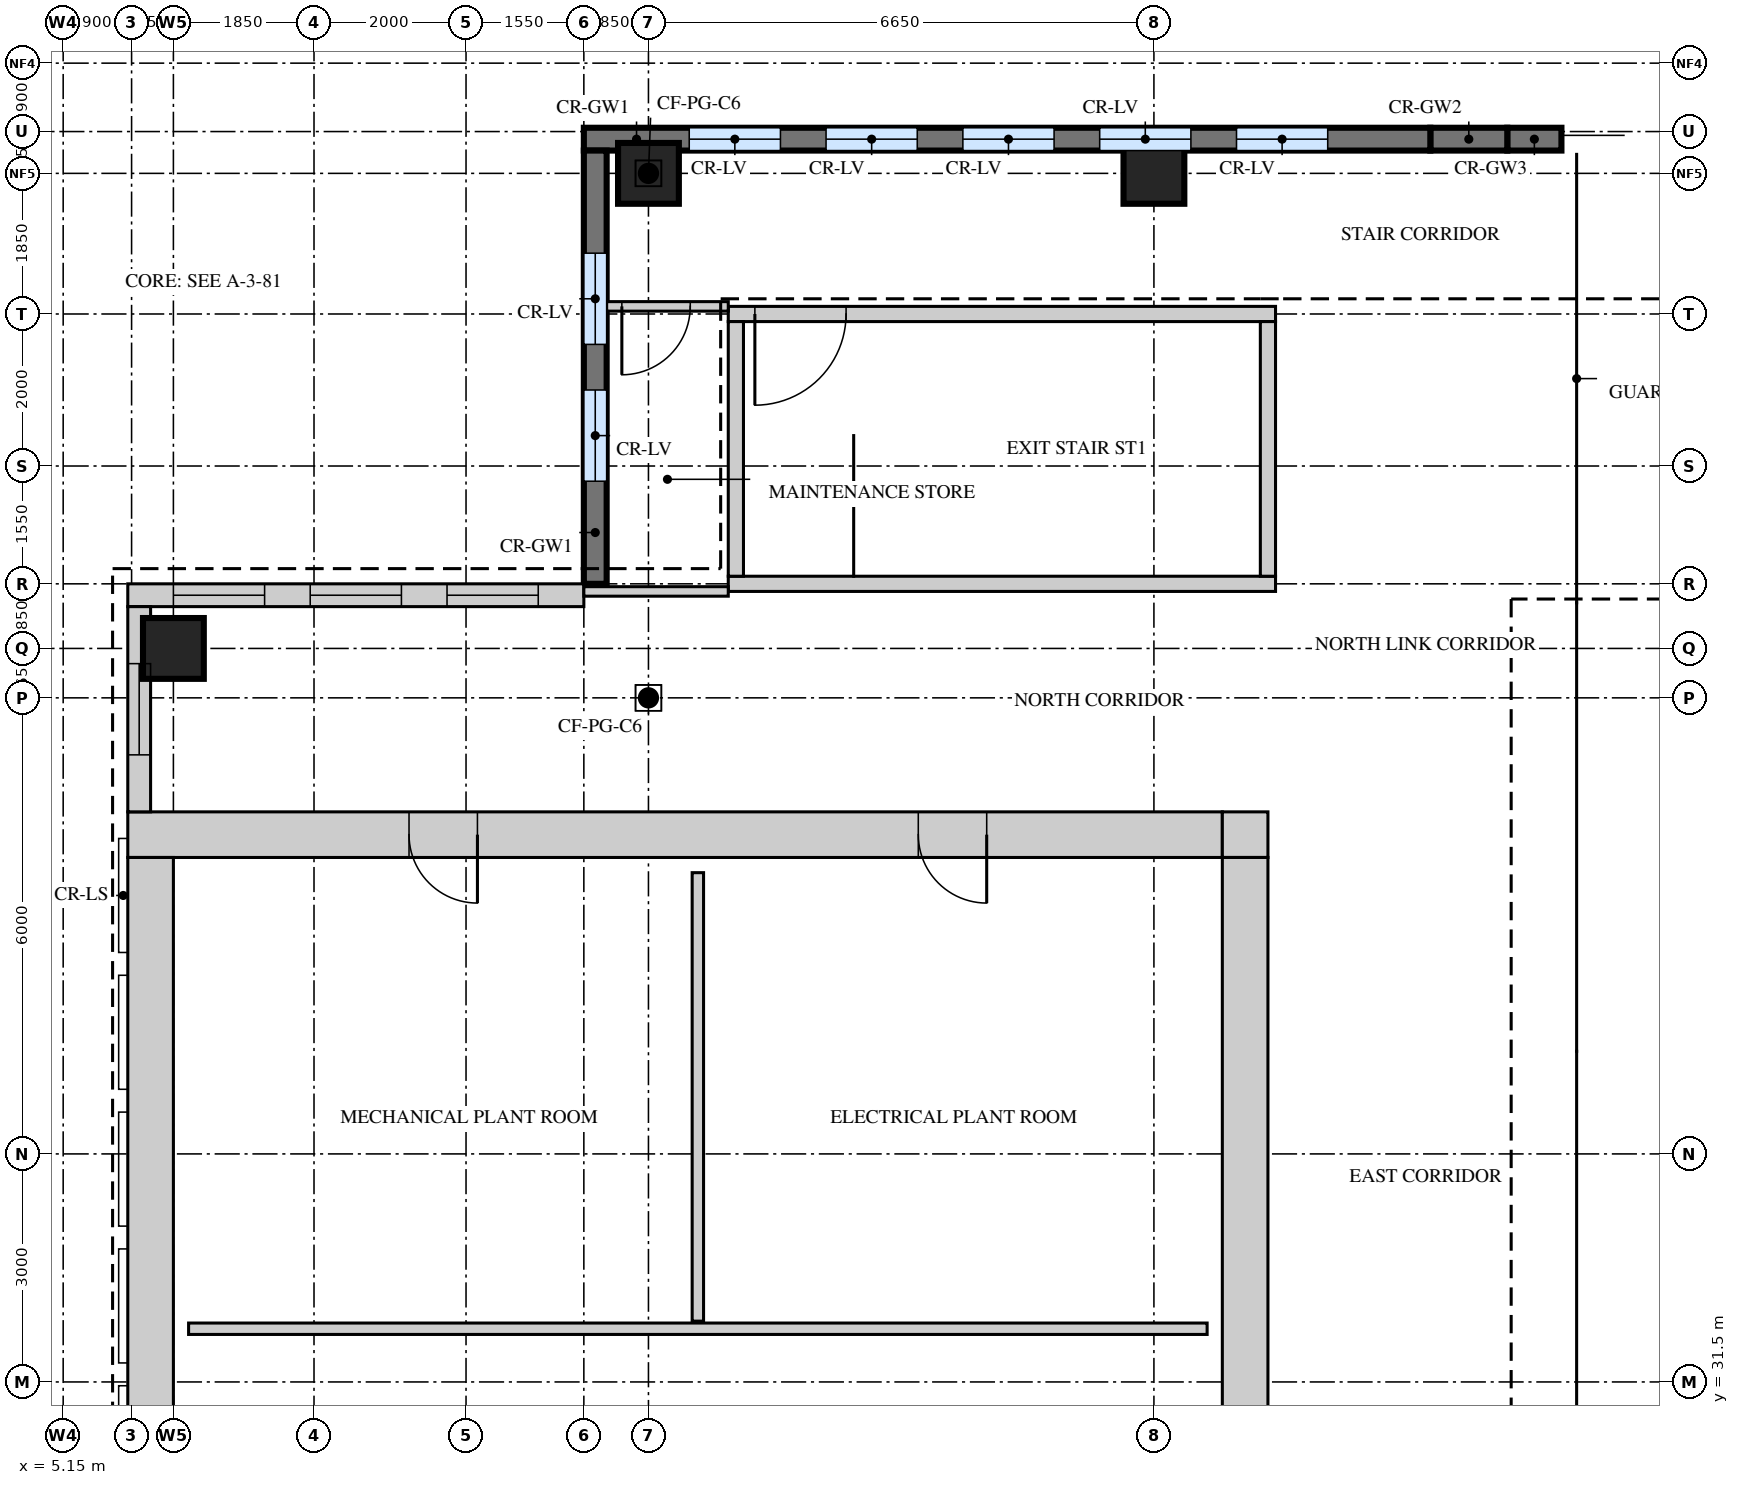
"""IFC4 building model, lengths in metres.
Left out: names, types, materials, properties, quantities, classifications, styles, units other than length and angle.
Written with IfcOpenShell. Run it as: python <this file> out.ifc"""

import sys

from ifc_helpers import new_model, si_unit, direction, frame, frame_2d, origin, origin_2d, place, context, subcontext, project, spatial, rectangle, extrude, source, transform, mapped, element, fill, save


model = new_model("IFC4")
c1 = context("Model", 3, precision=1e-05, world=origin(), true_north=direction((0.0, 1.0)))
c2 = subcontext(c1, "Body", "Model", "MODEL_VIEW")
j1 = project(units=[si_unit("LENGTHUNIT", "METRE"), si_unit("PLANEANGLEUNIT", "RADIAN")], contexts=[c1])
p1 = place(None, origin())
s1 = spatial("IfcSite", under=j1, at=p1, CompositionType="ELEMENT")
p2 = place(p1, origin())
s2 = spatial("IfcBuilding", under=s1, at=p2, CompositionType="ELEMENT")
p3 = place(p2, frame((0.0, 0.0, 352.7)))
s3 = spatial("IfcBuildingStorey", under=s2, at=p3, CompositionType="ELEMENT", Elevation=352.7)
m1 = source(origin(), c2, "Body", "SweptSolid", [
    extrude(rectangle(XDim=14.4, YDim=0.6, at=frame_2d((7.2, 0.0))), origin(), (0.0, 0.0, 1.0), 4.5),
])
p4 = place(p3, frame((6.0, 38.7, 0.0), z_axis=(0.0, 0.0, 1.0), x_axis=(1.0, 0.0, 0.0)))
e1 = element("IfcWall", 1, at=p4, inside=s3, PredefinedType="SHEAR", context=c2, shape_type="MappedRepresentation", body=[
    mapped(m1, transform((0.0, 0.0, 0.0))),
])
m2 = source(origin(), c2, "Body", "SweptSolid", [
    extrude(rectangle(XDim=0.9, YDim=2.1, at=frame_2d((0.45, 1.05))), frame((0.0, 0.31, 0.0), z_axis=(0.0, -1.0, 0.0), x_axis=(1.0, 0.0, 0.0)), (0.0, 0.0, 1.0), 0.62),
])
p5 = place(p4, frame((3.7, 0.0, 0.0)))
e2 = element("IfcOpeningElement", 2, at=p5, cuts=e1, PredefinedType="OPENING", context=c2, shape_type="MappedRepresentation", body=[
    mapped(m2, transform((0.0, 0.0, 0.0))),
])
p6 = place(p4, frame((10.4, 0.0, 0.0)))
e3 = element("IfcOpeningElement", 3, at=p6, cuts=e1, PredefinedType="OPENING", context=c2, shape_type="MappedRepresentation", body=[
    mapped(m2, transform((0.0, 0.0, 0.0))),
])
m3 = source(origin(), c2, "Body", "SweptSolid", [
    extrude(rectangle(XDim=0.6, YDim=0.6, at=frame_2d((0.3, 0.0))), origin(), (0.0, 0.0, 1.0), 4.5),
])
p7 = place(p3, frame((20.4, 38.7, 0.0), z_axis=(0.0, 0.0, 1.0), x_axis=(1.0, 0.0, 0.0)))
e4 = element("IfcWall", 4, at=p7, inside=s3, PredefinedType="SHEAR", context=c2, shape_type="MappedRepresentation", body=[
    mapped(m3, transform((0.0, 0.0, 0.0))),
])
m4 = source(origin(), c2, "Body", "SweptSolid", [
    extrude(rectangle(XDim=22.8, YDim=0.6, at=frame_2d((11.4, 0.0))), origin(), (0.0, 0.0, 1.0), 4.5),
])
p8 = place(p3, frame((20.7, 15.6, 0.0), z_axis=(0.0, 0.0, 1.0), x_axis=(0.0, 1.0, 0.0)))
e5 = element("IfcWall", 5, at=p8, inside=s3, PredefinedType="SHEAR", context=c2, shape_type="MappedRepresentation", body=[
    mapped(m4, transform((0.0, 0.0, 0.0))),
])
p9 = place(p8, frame((8.2, 0.0, 0.0)))
e6 = element("IfcOpeningElement", 6, at=p9, cuts=e5, PredefinedType="OPENING", context=c2, shape_type="MappedRepresentation", body=[
    mapped(m2, transform((0.0, 0.0, 0.0))),
])
p10 = place(p8, frame((11.35, 0.0, 0.0)))
e7 = element("IfcOpeningElement", 7, at=p10, cuts=e5, PredefinedType="OPENING", context=c2, shape_type="MappedRepresentation", body=[
    mapped(m2, transform((0.0, 0.0, 0.0))),
])
p11 = place(p8, frame((14.65, 0.0, 0.0)))
e8 = element("IfcOpeningElement", 8, at=p11, cuts=e5, PredefinedType="OPENING", context=c2, shape_type="MappedRepresentation", body=[
    mapped(m2, transform((0.0, 0.0, 0.0))),
])
p12 = place(p8, frame((1.55, 0.0, 0.0)))
e9 = element("IfcOpeningElement", 9, at=p12, cuts=e5, PredefinedType="OPENING", context=c2, shape_type="MappedRepresentation", body=[
    mapped(m2, transform((0.0, 0.0, 0.0))),
])
p13 = place(p8, frame((5.1, 0.0, 0.0)))
e10 = element("IfcOpeningElement", 10, at=p13, cuts=e5, PredefinedType="OPENING", context=c2, shape_type="MappedRepresentation", body=[
    mapped(m2, transform((0.0, 0.0, 0.0))),
])
p14 = place(p3, frame((6.3, 15.6, 0.0), z_axis=(0.0, 0.0, 1.0), x_axis=(0.0, 1.0, 0.0)))
e11 = element("IfcWall", 11, at=p14, inside=s3, PredefinedType="SHEAR", context=c2, shape_type="MappedRepresentation", body=[
    mapped(m4, transform((0.0, 0.0, 0.0))),
])
m5 = source(origin(), c2, "Body", "SweptSolid", [
    extrude(rectangle(XDim=7.2, YDim=0.2, at=frame_2d((3.6, 0.0))), origin(), (0.0, 0.0, 1.0), 4.5),
])
p15 = place(p3, frame((13.9, 45.55, 0.0), z_axis=(0.0, 0.0, 1.0), x_axis=(1.0, 0.0, 0.0)))
e12 = element("IfcWall", 12, at=p15, inside=s3, PredefinedType="SHEAR", context=c2, shape_type="MappedRepresentation", body=[
    mapped(m5, transform((0.0, 0.0, 0.0))),
])
m6 = source(origin(), c2, "Body", "SweptSolid", [
    extrude(rectangle(XDim=1.2, YDim=2.1, at=frame_2d((0.6, 1.05))), frame((0.0, 0.11, 0.0), z_axis=(0.0, -1.0, 0.0), x_axis=(1.0, 0.0, 0.0)), (0.0, 0.0, 1.0), 0.22),
])
p16 = place(p15, frame((0.35, 0.0, 0.0)))
e13 = element("IfcOpeningElement", 13, at=p16, cuts=e12, PredefinedType="OPENING", context=c2, shape_type="MappedRepresentation", body=[
    mapped(m6, transform((0.0, 0.0, 0.0))),
])
p17 = place(p3, frame((13.9, 42.0, 0.0), z_axis=(0.0, 0.0, 1.0), x_axis=(1.0, 0.0, 0.0)))
e14 = element("IfcWall", 14, at=p17, inside=s3, PredefinedType="SHEAR", context=c2, shape_type="MappedRepresentation", body=[
    mapped(m5, transform((0.0, 0.0, 0.0))),
])
m7 = source(origin(), c2, "Body", "SweptSolid", [
    extrude(rectangle(XDim=3.35, YDim=0.2, at=frame_2d((1.675, 0.0))), origin(), (0.0, 0.0, 1.0), 4.5),
])
for number, where, z_axis, x_axis in (
    (15, (21.0, 42.1, 0.0), (0.0, 0.0, 1.0), (0.0, 1.0, 0.0)),
    (16, (14.0, 42.1, 0.0), (0.0, 0.0, 1.0), (0.0, 1.0, 0.0)),
):
    element("IfcWall", number, at=place(p3, frame(where, z_axis=z_axis, x_axis=x_axis)), inside=s3, PredefinedType="SHEAR", context=c2, shape_type="MappedRepresentation", body=[
        mapped(m7, transform((0.0, 0.0, 0.0))),
    ])
m8 = source(origin(), c2, "Body", "SweptSolid", [
    extrude(rectangle(XDim=0.8, YDim=0.8, at=origin_2d()), origin(), (0.0, 0.0, 1.0), 3.45),
])
for number, where, z_axis, x_axis in (
    (17, (12.85, 47.4, 0.0), (0.0, 0.0, 1.0), (1.0, 0.0, 0.0)),
    (18, (19.5, 47.4, 0.0), (0.0, 0.0, 1.0), (1.0, 0.0, 0.0)),
    (19, (6.6, 41.15, 0.0), (0.0, 0.0, 1.0), (1.0, 0.0, 0.0)),
):
    element("IfcColumn", number, at=place(p3, frame(where, z_axis=z_axis, x_axis=x_axis)), inside=s3, PredefinedType="COLUMN", context=c2, shape_type="MappedRepresentation", body=[
        mapped(m8, transform((0.0, 0.0, 0.0))),
    ])
m9 = source(origin(), c2, "Body", "SweptSolid", [
    extrude(rectangle(XDim=0.712, YDim=0.3, at=frame_2d((0.356, 0.0))), origin(), (0.0, 0.0, 1.0), 2.3),
])
p18 = place(p3, frame((24.861, 47.85, 0.0), z_axis=(0.0, 0.0, 1.0), x_axis=(-1.0, 0.0, 0.0)))
e20 = element("IfcWall", 20, at=p18, inside=s3, PredefinedType="SOLIDWALL", context=c2, shape_type="MappedRepresentation", body=[
    mapped(m9, transform((0.0, 0.0, 0.0))),
])
m10 = source(origin(), c2, "Body", "SweptSolid", [
    extrude(rectangle(XDim=1.012, YDim=0.3, at=frame_2d((0.506, 0.0))), origin(), (0.0, 0.0, 1.0), 4.05),
])
p19 = place(p3, frame((24.149, 47.85, 0.0), z_axis=(0.0, 0.0, 1.0), x_axis=(-1.0, 0.0, 0.0)))
e21 = element("IfcWall", 21, at=p19, inside=s3, PredefinedType="SOLIDWALL", context=c2, shape_type="MappedRepresentation", body=[
    mapped(m10, transform((0.0, 0.0, 0.0))),
])
m11 = source(origin(), c2, "Body", "SweptSolid", [
    extrude(rectangle(XDim=11.136, YDim=0.3, at=frame_2d((5.568, 0.0))), origin(), (0.0, 0.0, 1.0), 4.5),
])
p20 = place(p3, frame((23.136, 47.85, 0.0), z_axis=(0.0, 0.0, 1.0), x_axis=(-1.0, 0.0, 0.0)))
e22 = element("IfcWall", 22, at=p20, inside=s3, PredefinedType="SOLIDWALL", context=c2, shape_type="MappedRepresentation", body=[
    mapped(m11, transform((0.0, 0.0, 0.0))),
])
m12 = source(origin(), c2, "Body", "SweptSolid", [
    extrude(rectangle(XDim=1.2, YDim=2.4, at=frame_2d((0.6, 1.2))), frame((0.0, 0.16, 0.0), z_axis=(0.0, -1.0, 0.0), x_axis=(1.0, 0.0, 0.0)), (0.0, 0.0, 1.0), 0.32),
])
p21 = place(p20, frame((1.35, 0.0, 0.9)))
e23 = element("IfcOpeningElement", 23, at=p21, cuts=e22, PredefinedType="OPENING", context=c2, shape_type="MappedRepresentation", body=[
    mapped(m12, transform((0.0, 0.0, 0.0))),
])
p22 = place(p20, frame((3.15, 0.0, 0.9)))
e24 = element("IfcOpeningElement", 24, at=p22, cuts=e22, PredefinedType="OPENING", context=c2, shape_type="MappedRepresentation", body=[
    mapped(m12, transform((0.0, 0.0, 0.0))),
])
p23 = place(p20, frame((4.95, 0.0, 0.9)))
e25 = element("IfcOpeningElement", 25, at=p23, cuts=e22, PredefinedType="OPENING", context=c2, shape_type="MappedRepresentation", body=[
    mapped(m12, transform((0.0, 0.0, 0.0))),
])
p24 = place(p20, frame((6.75, 0.0, 0.9)))
e26 = element("IfcOpeningElement", 26, at=p24, cuts=e22, PredefinedType="OPENING", context=c2, shape_type="MappedRepresentation", body=[
    mapped(m12, transform((0.0, 0.0, 0.0))),
])
p25 = place(p20, frame((8.55, 0.0, 0.9)))
e27 = element("IfcOpeningElement", 27, at=p25, cuts=e22, PredefinedType="OPENING", context=c2, shape_type="MappedRepresentation", body=[
    mapped(m12, transform((0.0, 0.0, 0.0))),
])
m13 = source(origin(), c2, "Body", "SweptSolid", [
    extrude(rectangle(XDim=5.7, YDim=0.3, at=frame_2d((2.85, 0.0))), origin(), (0.0, 0.0, 1.0), 4.5),
])
p26 = place(p3, frame((12.15, 47.7, 0.0), z_axis=(0.0, 0.0, 1.0), x_axis=(0.0, -1.0, 0.0)))
e28 = element("IfcWall", 28, at=p26, inside=s3, PredefinedType="SOLIDWALL", context=c2, shape_type="MappedRepresentation", body=[
    mapped(m13, transform((0.0, 0.0, 0.0))),
])
p27 = place(p26, frame((1.35, 0.0, 0.9)))
e29 = element("IfcOpeningElement", 29, at=p27, cuts=e28, PredefinedType="OPENING", context=c2, shape_type="MappedRepresentation", body=[
    mapped(m12, transform((0.0, 0.0, 0.0))),
])
p28 = place(p26, frame((3.15, 0.0, 0.9)))
e30 = element("IfcOpeningElement", 30, at=p28, cuts=e28, PredefinedType="OPENING", context=c2, shape_type="MappedRepresentation", body=[
    mapped(m12, transform((0.0, 0.0, 0.0))),
])
m14 = source(origin(), c2, "Body", "SweptSolid", [
    extrude(rectangle(XDim=6.0, YDim=0.3, at=frame_2d((3.0, 0.0))), origin(), (0.0, 0.0, 1.0), 4.5),
])
p29 = place(p3, frame((12.0, 41.85, 0.0), z_axis=(0.0, 0.0, 1.0), x_axis=(-1.0, 0.0, 0.0)))
e31 = element("IfcWall", 31, at=p29, inside=s3, PredefinedType="SOLIDWALL", context=c2, shape_type="MappedRepresentation", body=[
    mapped(m14, transform((0.0, 0.0, 0.0))),
])
p30 = place(p29, frame((0.6, 0.0, 0.9)))
e32 = element("IfcOpeningElement", 32, at=p30, cuts=e31, PredefinedType="OPENING", context=c2, shape_type="MappedRepresentation", body=[
    mapped(m12, transform((0.0, 0.0, 0.0))),
])
p31 = place(p29, frame((2.4, 0.0, 0.9)))
e33 = element("IfcOpeningElement", 33, at=p31, cuts=e31, PredefinedType="OPENING", context=c2, shape_type="MappedRepresentation", body=[
    mapped(m12, transform((0.0, 0.0, 0.0))),
])
p32 = place(p29, frame((4.2, 0.0, 0.9)))
e34 = element("IfcOpeningElement", 34, at=p32, cuts=e31, PredefinedType="OPENING", context=c2, shape_type="MappedRepresentation", body=[
    mapped(m12, transform((0.0, 0.0, 0.0))),
])
m15 = source(origin(), c2, "Body", "SweptSolid", [
    extrude(rectangle(XDim=2.7, YDim=0.3, at=frame_2d((1.35, 0.0))), origin(), (0.0, 0.0, 1.0), 4.5),
])
p33 = place(p3, frame((6.15, 41.7, 0.0), z_axis=(0.0, 0.0, 1.0), x_axis=(0.0, -1.0, 0.0)))
e35 = element("IfcWall", 35, at=p33, inside=s3, PredefinedType="SOLIDWALL", context=c2, shape_type="MappedRepresentation", body=[
    mapped(m15, transform((0.0, 0.0, 0.0))),
])
p34 = place(p33, frame((0.75, 0.0, 0.9)))
e36 = element("IfcOpeningElement", 36, at=p34, cuts=e35, PredefinedType="OPENING", context=c2, shape_type="MappedRepresentation", body=[
    mapped(m12, transform((0.0, 0.0, 0.0))),
])
m16 = source(origin(), c2, "Body", "SweptSolid", [
    extrude(rectangle(XDim=13.4, YDim=0.15, at=frame_2d((6.7, 0.0))), origin(), (0.0, 0.0, 1.0), 4.5),
])
p35 = place(p3, frame((6.8, 32.2, 0.0), z_axis=(0.0, 0.0, 1.0), x_axis=(1.0, 0.0, 0.0)))
e37 = element("IfcWall", 37, at=p35, inside=s3, PredefinedType="PARTITIONING", context=c2, shape_type="MappedRepresentation", body=[
    mapped(m16, transform((0.0, 0.0, 0.0))),
])
m17 = source(origin(), c2, "Body", "SweptSolid", [
    extrude(rectangle(XDim=5.9, YDim=0.15, at=frame_2d((2.95, 0.0))), origin(), (0.0, 0.0, 1.0), 4.5),
])
p36 = place(p3, frame((13.5, 32.3, 0.0), z_axis=(0.0, 0.0, 1.0), x_axis=(0.0, 1.0, 0.0)))
e38 = element("IfcWall", 38, at=p36, inside=s3, PredefinedType="PARTITIONING", context=c2, shape_type="MappedRepresentation", body=[
    mapped(m17, transform((0.0, 0.0, 0.0))),
])
m18 = source(origin(), c2, "Body", "SweptSolid", [
    extrude(rectangle(XDim=1.9, YDim=0.125, at=frame_2d((0.95, 0.0))), origin(), (0.0, 0.0, 1.0), 4.5),
])
p37 = place(p3, frame((12.0, 41.9, 0.0), z_axis=(0.0, 0.0, 1.0), x_axis=(1.0, 0.0, 0.0)))
e39 = element("IfcWall", 39, at=p37, inside=s3, PredefinedType="PARTITIONING", context=c2, shape_type="MappedRepresentation", body=[
    mapped(m18, transform((0.0, 0.0, 0.0))),
])
m19 = source(origin(), c2, "Body", "SweptSolid", [
    extrude(rectangle(XDim=1.6, YDim=0.125, at=frame_2d((0.8, 0.0))), origin(), (0.0, 0.0, 1.0), 4.5),
])
p38 = place(p3, frame((12.3, 45.65, 0.0), z_axis=(0.0, 0.0, 1.0), x_axis=(1.0, 0.0, 0.0)))
e40 = element("IfcWall", 40, at=p38, inside=s3, PredefinedType="PARTITIONING", context=c2, shape_type="MappedRepresentation", body=[
    mapped(m19, transform((0.0, 0.0, 0.0))),
])
m20 = source(origin(), c2, "Body", "SweptSolid", [
    extrude(rectangle(XDim=0.9, YDim=2.1, at=frame_2d((0.45, 1.05))), frame((0.0, 0.073, 0.0), z_axis=(0.0, -1.0, 0.0), x_axis=(1.0, 0.0, 0.0)), (0.0, 0.0, 1.0), 0.145),
])
p39 = place(p38, frame((0.2, 0.0, 0.0)))
e41 = element("IfcOpeningElement", 41, at=p39, cuts=e40, PredefinedType="OPENING", context=c2, shape_type="MappedRepresentation", body=[
    mapped(m20, transform((0.0, 0.0, 0.0))),
])
m21 = source(origin(), c2, "Body", "SweptSolid", [
    extrude(rectangle(XDim=1.2, YDim=2.4, at=frame_2d((0.6, 1.2))), frame((0.0, 0.03, 0.0), z_axis=(0.0, -1.0, 0.0), x_axis=(1.0, 0.0, 0.0)), (0.0, 0.0, 1.0), 0.06),
])
p40 = place(p21, origin())
e42 = element("IfcWindow", 42, at=p40, inside=s3, PartitioningType="SINGLE_PANEL", PredefinedType="WINDOW", context=c2, shape_type="MappedRepresentation", body=[
    mapped(m21, transform((0.0, 0.0, 0.0))),
])
fill(e23, e42)
p41 = place(p22, origin())
e43 = element("IfcWindow", 43, at=p41, inside=s3, PartitioningType="SINGLE_PANEL", PredefinedType="WINDOW", context=c2, shape_type="MappedRepresentation", body=[
    mapped(m21, transform((0.0, 0.0, 0.0))),
])
fill(e24, e43)
p42 = place(p23, origin())
e44 = element("IfcWindow", 44, at=p42, inside=s3, PartitioningType="SINGLE_PANEL", PredefinedType="WINDOW", context=c2, shape_type="MappedRepresentation", body=[
    mapped(m21, transform((0.0, 0.0, 0.0))),
])
fill(e25, e44)
p43 = place(p24, origin())
e45 = element("IfcWindow", 45, at=p43, inside=s3, PartitioningType="SINGLE_PANEL", PredefinedType="WINDOW", context=c2, shape_type="MappedRepresentation", body=[
    mapped(m21, transform((0.0, 0.0, 0.0))),
])
fill(e26, e45)
p44 = place(p25, origin())
e46 = element("IfcWindow", 46, at=p44, inside=s3, PartitioningType="SINGLE_PANEL", PredefinedType="WINDOW", context=c2, shape_type="MappedRepresentation", body=[
    mapped(m21, transform((0.0, 0.0, 0.0))),
])
fill(e27, e46)
p45 = place(p27, origin())
e47 = element("IfcWindow", 47, at=p45, inside=s3, PartitioningType="SINGLE_PANEL", PredefinedType="WINDOW", context=c2, shape_type="MappedRepresentation", body=[
    mapped(m21, transform((0.0, 0.0, 0.0))),
])
fill(e29, e47)
p46 = place(p28, origin())
e48 = element("IfcWindow", 48, at=p46, inside=s3, PartitioningType="SINGLE_PANEL", PredefinedType="WINDOW", context=c2, shape_type="MappedRepresentation", body=[
    mapped(m21, transform((0.0, 0.0, 0.0))),
])
fill(e30, e48)
p47 = place(p30, origin())
e49 = element("IfcWindow", 49, at=p47, inside=s3, PartitioningType="SINGLE_PANEL", PredefinedType="WINDOW", context=c2, shape_type="MappedRepresentation", body=[
    mapped(m21, transform((0.0, 0.0, 0.0))),
])
fill(e32, e49)
p48 = place(p31, origin())
e50 = element("IfcWindow", 50, at=p48, inside=s3, PartitioningType="SINGLE_PANEL", PredefinedType="WINDOW", context=c2, shape_type="MappedRepresentation", body=[
    mapped(m21, transform((0.0, 0.0, 0.0))),
])
fill(e33, e50)
p49 = place(p32, origin())
e51 = element("IfcWindow", 51, at=p49, inside=s3, PartitioningType="SINGLE_PANEL", PredefinedType="WINDOW", context=c2, shape_type="MappedRepresentation", body=[
    mapped(m21, transform((0.0, 0.0, 0.0))),
])
fill(e34, e51)
p50 = place(p34, origin())
e52 = element("IfcWindow", 52, at=p50, inside=s3, PartitioningType="SINGLE_PANEL", PredefinedType="WINDOW", context=c2, shape_type="MappedRepresentation", body=[
    mapped(m21, transform((0.0, 0.0, 0.0))),
])
fill(e36, e52)
m22 = source(origin(), c2, "Body", "SweptSolid", [
    extrude(rectangle(XDim=0.9, YDim=2.1, at=frame_2d((0.45, 1.05))), frame((0.0, 0.025, 0.0), z_axis=(0.0, -1.0, 0.0), x_axis=(1.0, 0.0, 0.0)), (0.0, 0.0, 1.0), 0.05),
])
p51 = place(p39, origin())
e53 = element("IfcDoor", 53, at=p51, inside=s3, OperationType="SINGLE_SWING_LEFT", PredefinedType="DOOR", context=c2, shape_type="MappedRepresentation", body=[
    mapped(m22, transform((0.0, 0.0, 0.0))),
])
fill(e41, e53)
m23 = source(origin(), c2, "Body", "SweptSolid", [
    extrude(rectangle(XDim=0.9, YDim=2.1, at=frame_2d((0.45, 1.05))), frame((0.0, 0.25, 0.0), z_axis=(0.0, -1.0, 0.0), x_axis=(1.0, 0.0, 0.0)), (0.0, 0.0, 1.0), 0.5),
])
p52 = place(p5, origin())
e54 = element("IfcDoor", 54, at=p52, inside=s3, OperationType="SINGLE_SWING_RIGHT", PredefinedType="DOOR", context=c2, shape_type="MappedRepresentation", body=[
    mapped(m23, transform((0.0, 0.0, 0.0))),
])
fill(e2, e54)
p53 = place(p6, origin())
e55 = element("IfcDoor", 55, at=p53, inside=s3, OperationType="SINGLE_SWING_RIGHT", PredefinedType="DOOR", context=c2, shape_type="MappedRepresentation", body=[
    mapped(m23, transform((0.0, 0.0, 0.0))),
])
fill(e3, e55)
m24 = source(origin(), c2, "Body", "SweptSolid", [
    extrude(rectangle(XDim=1.2, YDim=2.1, at=frame_2d((0.6, 1.05))), frame((0.0, 0.025, 0.0), z_axis=(0.0, -1.0, 0.0), x_axis=(1.0, 0.0, 0.0)), (0.0, 0.0, 1.0), 0.05),
])
p54 = place(p16, origin())
e56 = element("IfcDoor", 56, at=p54, inside=s3, OperationType="SINGLE_SWING_LEFT", PredefinedType="DOOR", context=c2, shape_type="MappedRepresentation", body=[
    mapped(m24, transform((0.0, 0.0, 0.0))),
])
fill(e13, e56)
save(model, sys.argv[1])
